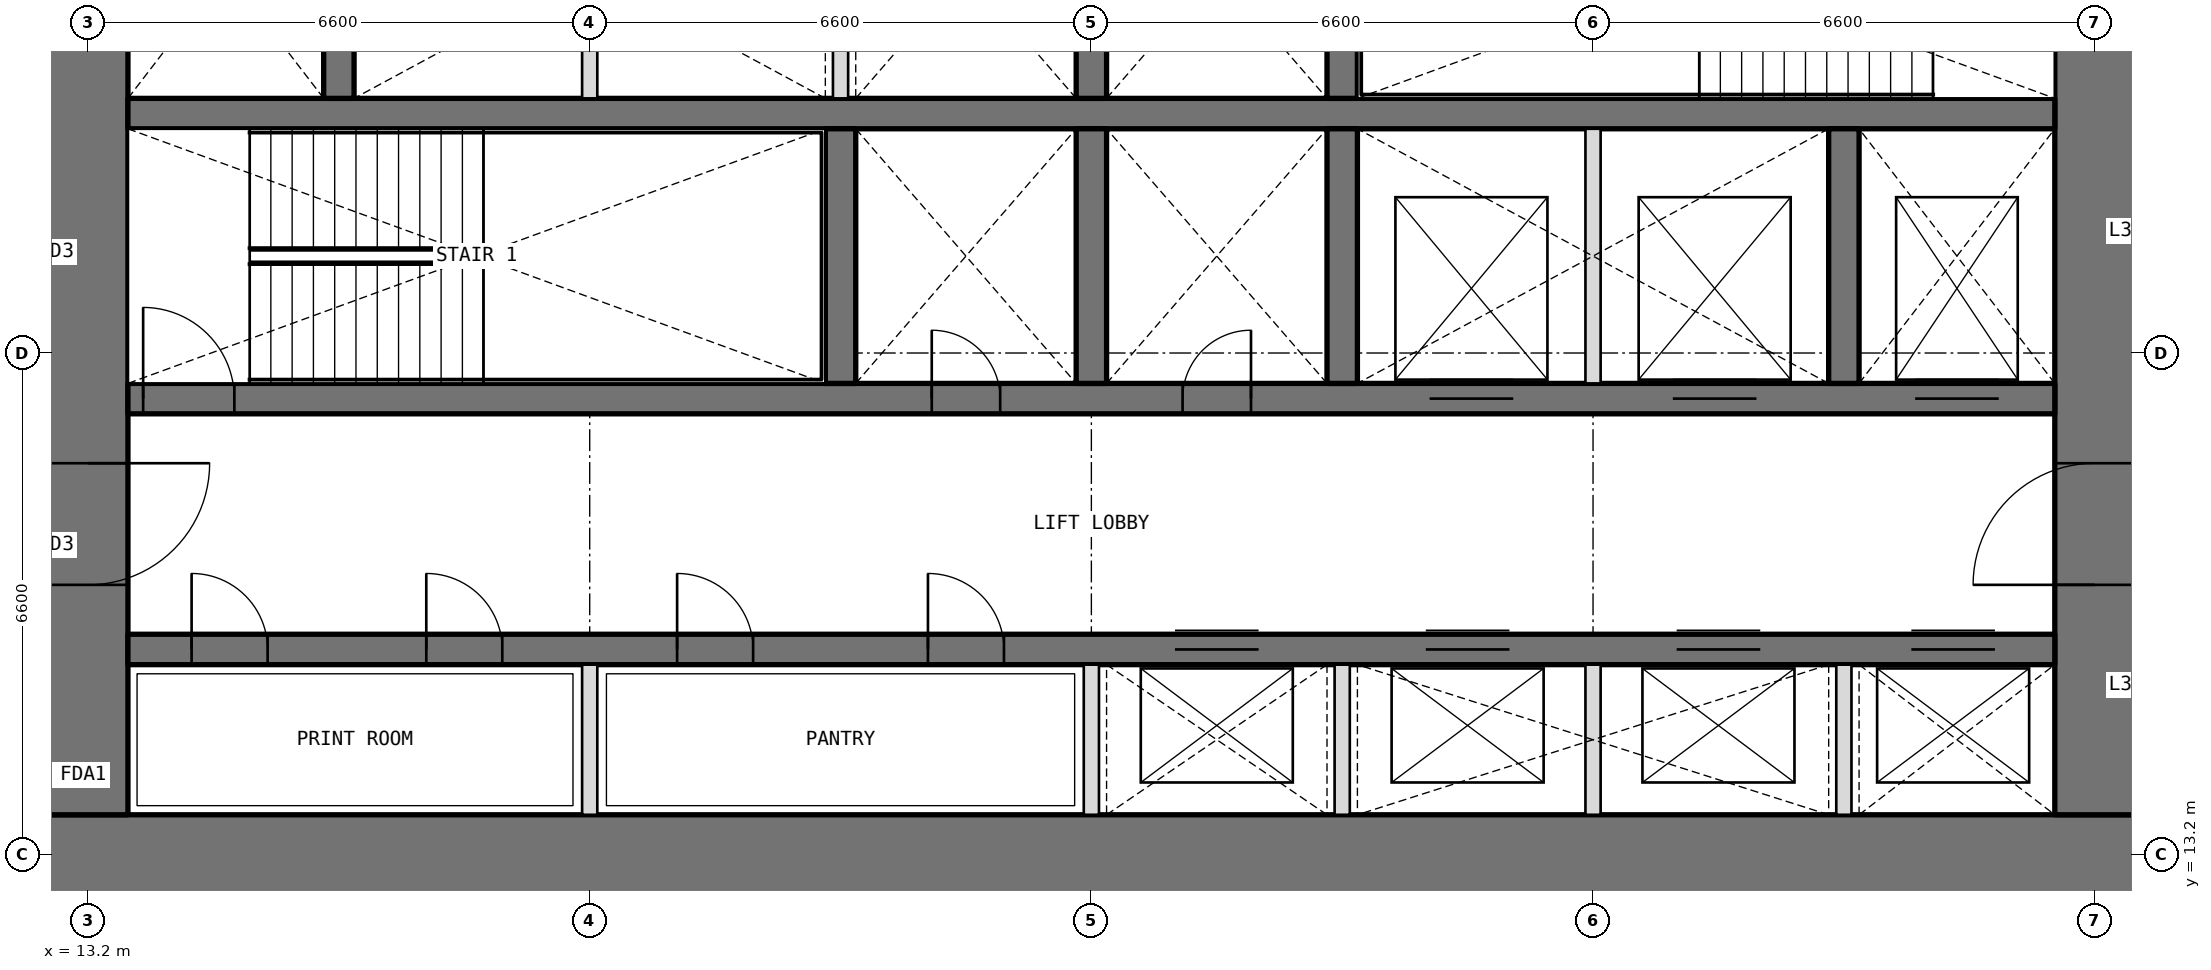
"""IFC4 building model, lengths in metres.
Left out: names, types, materials, properties, quantities, classifications, styles, units other than length and angle.
Written with IfcOpenShell. Run it as: python <this file> out.ifc"""

import sys

from ifc_helpers import new_model, si_unit, direction, frame, frame_2d, origin, place, context, subcontext, project, spatial, rectangle, extrude, element, fill, save


model = new_model("IFC4")
c1 = context("Model", 3, precision=1e-05, world=origin(), true_north=direction((0.0, 1.0)))
c2 = subcontext(c1, "Body", "Model", "MODEL_VIEW")
j1 = project(units=[si_unit("LENGTHUNIT", "METRE"), si_unit("PLANEANGLEUNIT", "RADIAN")], contexts=[c1])
p1 = place(None, origin())
s1 = spatial("IfcSite", under=j1, at=p1, CompositionType="ELEMENT")
p2 = place(p1, origin())
s2 = spatial("IfcBuilding", under=s1, at=p2, CompositionType="ELEMENT")
p3 = place(p2, frame((0.0, 0.0, 145.2)))
s3 = spatial("IfcBuildingStorey", under=s2, at=p3, CompositionType="ELEMENT", Elevation=145.2)
p4 = place(p3, frame((12.675, 13.2, 0.0), z_axis=(0.0, 0.0, 1.0), x_axis=(1.0, 0.0, 0.0)))
e1 = element("IfcWall", 1, at=p4, inside=s3, PredefinedType="SHEAR", context=c2, shape_type="SweptSolid", body=[
    extrude(rectangle(XDim=27.45, YDim=1.05, at=frame_2d((13.725, 0.0))), origin(), (0.0, 0.0, 1.0), 4.2),
])
p5 = place(p3, frame((39.6, 13.725, 0.0), z_axis=(0.0, 0.0, 1.0), x_axis=(0.0, 1.0, 0.0)))
e2 = element("IfcWall", 2, at=p5, inside=s3, PredefinedType="SHEAR", context=c2, shape_type="SweptSolid", body=[
    extrude(rectangle(XDim=18.75, YDim=1.05, at=frame_2d((9.375, 0.0))), origin(), (0.0, 0.0, 1.0), 4.2),
])
p6 = place(p5, frame((3.025, 0.0, 0.0)))
e3 = element("IfcOpeningElement", 3, at=p6, cuts=e2, PredefinedType="OPENING", context=c2, shape_type="SweptSolid", body=[
    extrude(rectangle(XDim=1.6, YDim=2.1, at=frame_2d((0.8, 1.05))), frame((0.0, 0.535, 0.0), z_axis=(0.0, -1.0, 0.0), x_axis=(1.0, 0.0, 0.0)), (0.0, 0.0, 1.0), 1.07),
])
p7 = place(p5, frame((13.825, 0.0, 0.0)))
e4 = element("IfcOpeningElement", 4, at=p7, cuts=e2, PredefinedType="OPENING", context=c2, shape_type="SweptSolid", body=[
    extrude(rectangle(XDim=1.6, YDim=2.1, at=frame_2d((0.8, 1.05))), frame((0.0, 0.535, 0.0), z_axis=(0.0, -1.0, 0.0), x_axis=(1.0, 0.0, 0.0)), (0.0, 0.0, 1.0), 1.07),
])
p8 = place(p3, frame((13.2, 32.475, 0.0), z_axis=(0.0, 0.0, 1.0), x_axis=(0.0, -1.0, 0.0)))
e5 = element("IfcWall", 5, at=p8, inside=s3, PredefinedType="SHEAR", context=c2, shape_type="SweptSolid", body=[
    extrude(rectangle(XDim=18.75, YDim=1.05, at=frame_2d((9.375, 0.0))), origin(), (0.0, 0.0, 1.0), 4.2),
])
p9 = place(p8, frame((14.125, 0.0, 0.0)))
e6 = element("IfcOpeningElement", 6, at=p9, cuts=e5, PredefinedType="OPENING", context=c2, shape_type="SweptSolid", body=[
    extrude(rectangle(XDim=1.6, YDim=2.1, at=frame_2d((0.8, 1.05))), frame((0.0, 0.535, 0.0), z_axis=(0.0, -1.0, 0.0), x_axis=(1.0, 0.0, 0.0)), (0.0, 0.0, 1.0), 1.07),
])
p10 = place(p8, frame((3.325, 0.0, 0.0)))
e7 = element("IfcOpeningElement", 7, at=p10, cuts=e5, PredefinedType="OPENING", context=c2, shape_type="SweptSolid", body=[
    extrude(rectangle(XDim=1.6, YDim=2.1, at=frame_2d((0.8, 1.05))), frame((0.0, 0.535, 0.0), z_axis=(0.0, -1.0, 0.0), x_axis=(1.0, 0.0, 0.0)), (0.0, 0.0, 1.0), 1.07),
])
p11 = place(p3, frame((13.725, 15.9, 0.0), z_axis=(0.0, 0.0, 1.0), x_axis=(1.0, 0.0, 0.0)))
e8 = element("IfcWall", 8, at=p11, inside=s3, PredefinedType="SHEAR", context=c2, shape_type="SweptSolid", body=[
    extrude(rectangle(XDim=25.35, YDim=0.4, at=frame_2d((12.675, 0.0))), origin(), (0.0, 0.0, 1.0), 4.2),
])
p12 = place(p11, frame((0.837, 0.0, 0.0)))
e9 = element("IfcOpeningElement", 9, at=p12, cuts=e8, PredefinedType="OPENING", context=c2, shape_type="SweptSolid", body=[
    extrude(rectangle(XDim=1.0, YDim=2.1, at=frame_2d((0.5, 1.05))), frame((0.0, 0.21, 0.0), z_axis=(0.0, -1.0, 0.0), x_axis=(1.0, 0.0, 0.0)), (0.0, 0.0, 1.0), 0.42),
])
p13 = place(p11, frame((3.925, 0.0, 0.0)))
e10 = element("IfcOpeningElement", 10, at=p13, cuts=e8, PredefinedType="OPENING", context=c2, shape_type="SweptSolid", body=[
    extrude(rectangle(XDim=1.0, YDim=2.1, at=frame_2d((0.5, 1.05))), frame((0.0, 0.21, 0.0), z_axis=(0.0, -1.0, 0.0), x_axis=(1.0, 0.0, 0.0)), (0.0, 0.0, 1.0), 0.42),
])
p14 = place(p11, frame((7.225, 0.0, 0.0)))
e11 = element("IfcOpeningElement", 11, at=p14, cuts=e8, PredefinedType="OPENING", context=c2, shape_type="SweptSolid", body=[
    extrude(rectangle(XDim=1.0, YDim=2.1, at=frame_2d((0.5, 1.05))), frame((0.0, 0.21, 0.0), z_axis=(0.0, -1.0, 0.0), x_axis=(1.0, 0.0, 0.0)), (0.0, 0.0, 1.0), 0.42),
])
p15 = place(p11, frame((10.525, 0.0, 0.0)))
e12 = element("IfcOpeningElement", 12, at=p15, cuts=e8, PredefinedType="OPENING", context=c2, shape_type="SweptSolid", body=[
    extrude(rectangle(XDim=1.0, YDim=2.1, at=frame_2d((0.5, 1.05))), frame((0.0, 0.21, 0.0), z_axis=(0.0, -1.0, 0.0), x_axis=(1.0, 0.0, 0.0)), (0.0, 0.0, 1.0), 0.42),
])
p16 = place(p11, frame((13.775, 0.0, 0.0)))
e13 = element("IfcOpeningElement", 13, at=p16, cuts=e8, PredefinedType="OPENING", context=c2, shape_type="SweptSolid", body=[
    extrude(rectangle(XDim=1.1, YDim=2.1, at=frame_2d((0.55, 1.05))), frame((0.0, 0.21, 0.0), z_axis=(0.0, -1.0, 0.0), x_axis=(1.0, 0.0, 0.0)), (0.0, 0.0, 1.0), 0.42),
])
p17 = place(p11, frame((17.075, 0.0, 0.0)))
e14 = element("IfcOpeningElement", 14, at=p17, cuts=e8, PredefinedType="OPENING", context=c2, shape_type="SweptSolid", body=[
    extrude(rectangle(XDim=1.1, YDim=2.1, at=frame_2d((0.55, 1.05))), frame((0.0, 0.21, 0.0), z_axis=(0.0, -1.0, 0.0), x_axis=(1.0, 0.0, 0.0)), (0.0, 0.0, 1.0), 0.42),
])
p18 = place(p11, frame((20.375, 0.0, 0.0)))
e15 = element("IfcOpeningElement", 15, at=p18, cuts=e8, PredefinedType="OPENING", context=c2, shape_type="SweptSolid", body=[
    extrude(rectangle(XDim=1.1, YDim=2.1, at=frame_2d((0.55, 1.05))), frame((0.0, 0.21, 0.0), z_axis=(0.0, -1.0, 0.0), x_axis=(1.0, 0.0, 0.0)), (0.0, 0.0, 1.0), 0.42),
])
p19 = place(p11, frame((23.462, 0.0, 0.0)))
e16 = element("IfcOpeningElement", 16, at=p19, cuts=e8, PredefinedType="OPENING", context=c2, shape_type="SweptSolid", body=[
    extrude(rectangle(XDim=1.1, YDim=2.1, at=frame_2d((0.55, 1.05))), frame((0.0, 0.21, 0.0), z_axis=(0.0, -1.0, 0.0), x_axis=(1.0, 0.0, 0.0)), (0.0, 0.0, 1.0), 0.42),
])
p20 = place(p3, frame((13.725, 19.2, 0.0), z_axis=(0.0, 0.0, 1.0), x_axis=(1.0, 0.0, 0.0)))
e17 = element("IfcWall", 17, at=p20, inside=s3, PredefinedType="SHEAR", context=c2, shape_type="SweptSolid", body=[
    extrude(rectangle(XDim=25.35, YDim=0.4, at=frame_2d((12.675, 0.0))), origin(), (0.0, 0.0, 1.0), 4.2),
])
p21 = place(p20, frame((10.575, 0.0, 0.0)))
e18 = element("IfcOpeningElement", 18, at=p21, cuts=e17, PredefinedType="OPENING", context=c2, shape_type="SweptSolid", body=[
    extrude(rectangle(XDim=0.9, YDim=2.1, at=frame_2d((0.45, 1.05))), frame((0.0, 0.21, 0.0), z_axis=(0.0, -1.0, 0.0), x_axis=(1.0, 0.0, 0.0)), (0.0, 0.0, 1.0), 0.42),
])
p22 = place(p20, frame((13.875, 0.0, 0.0)))
e19 = element("IfcOpeningElement", 19, at=p22, cuts=e17, PredefinedType="OPENING", context=c2, shape_type="SweptSolid", body=[
    extrude(rectangle(XDim=0.9, YDim=2.1, at=frame_2d((0.45, 1.05))), frame((0.0, 0.21, 0.0), z_axis=(0.0, -1.0, 0.0), x_axis=(1.0, 0.0, 0.0)), (0.0, 0.0, 1.0), 0.42),
])
p23 = place(p20, frame((0.2, 0.0, 0.0)))
e20 = element("IfcOpeningElement", 20, at=p23, cuts=e17, PredefinedType="OPENING", context=c2, shape_type="SweptSolid", body=[
    extrude(rectangle(XDim=1.2, YDim=2.1, at=frame_2d((0.6, 1.05))), frame((0.0, 0.21, 0.0), z_axis=(0.0, -1.0, 0.0), x_axis=(1.0, 0.0, 0.0)), (0.0, 0.0, 1.0), 0.42),
])
p24 = place(p20, frame((23.512, 0.0, 0.0)))
e21 = element("IfcOpeningElement", 21, at=p24, cuts=e17, PredefinedType="OPENING", context=c2, shape_type="SweptSolid", body=[
    extrude(rectangle(XDim=1.1, YDim=2.1, at=frame_2d((0.55, 1.05))), frame((0.0, 0.21, 0.0), z_axis=(0.0, -1.0, 0.0), x_axis=(1.0, 0.0, 0.0)), (0.0, 0.0, 1.0), 0.42),
])
p25 = place(p20, frame((17.125, 0.0, 0.0)))
e22 = element("IfcOpeningElement", 22, at=p25, cuts=e17, PredefinedType="OPENING", context=c2, shape_type="SweptSolid", body=[
    extrude(rectangle(XDim=1.1, YDim=2.1, at=frame_2d((0.55, 1.05))), frame((0.0, 0.21, 0.0), z_axis=(0.0, -1.0, 0.0), x_axis=(1.0, 0.0, 0.0)), (0.0, 0.0, 1.0), 0.42),
])
p26 = place(p20, frame((20.325, 0.0, 0.0)))
e23 = element("IfcOpeningElement", 23, at=p26, cuts=e17, PredefinedType="OPENING", context=c2, shape_type="SweptSolid", body=[
    extrude(rectangle(XDim=1.1, YDim=2.1, at=frame_2d((0.55, 1.05))), frame((0.0, 0.21, 0.0), z_axis=(0.0, -1.0, 0.0), x_axis=(1.0, 0.0, 0.0)), (0.0, 0.0, 1.0), 0.42),
])
p27 = place(p3, frame((13.725, 22.95, 0.0), z_axis=(0.0, 0.0, 1.0), x_axis=(1.0, 0.0, 0.0)))
e24 = element("IfcWall", 24, at=p27, inside=s3, PredefinedType="SHEAR", context=c2, shape_type="SweptSolid", body=[
    extrude(rectangle(XDim=25.35, YDim=0.4, at=frame_2d((12.675, 0.0))), origin(), (0.0, 0.0, 1.0), 4.2),
])
for number, where, z_axis, x_axis in (
    (25, (23.1, 19.4, 0.0), (0.0, 0.0, 1.0), (0.0, 1.0, 0.0)),
    (26, (26.4, 19.4, 0.0), (0.0, 0.0, 1.0), (0.0, 1.0, 0.0)),
    (27, (29.7, 19.4, 0.0), (0.0, 0.0, 1.0), (0.0, 1.0, 0.0)),
    (28, (36.3, 19.4, 0.0), (0.0, 0.0, 1.0), (0.0, 1.0, 0.0)),
    (29, (16.5, 23.15, 0.0), (0.0, 0.0, 1.0), (0.0, 1.0, 0.0)),
    (30, (26.4, 23.15, 0.0), (0.0, 0.0, 1.0), (0.0, 1.0, 0.0)),
    (31, (29.7, 23.15, 0.0), (0.0, 0.0, 1.0), (0.0, 1.0, 0.0)),
):
    element("IfcWall", number, at=place(p3, frame(where, z_axis=z_axis, x_axis=x_axis)), inside=s3, PredefinedType="SHEAR", context=c2, shape_type="SweptSolid", body=[
        extrude(rectangle(XDim=3.35, YDim=0.4, at=frame_2d((1.675, 0.0))), origin(), (0.0, 0.0, 1.0), 4.2),
    ])
for number, where, z_axis, x_axis in (
    (32, (19.8, 13.725, 0.0), (0.0, 0.0, 1.0), (0.0, 1.0, 0.0)),
    (33, (26.4, 13.725, 0.0), (0.0, 0.0, 1.0), (0.0, 1.0, 0.0)),
    (34, (29.7, 13.725, 0.0), (0.0, 0.0, 1.0), (0.0, 1.0, 0.0)),
    (35, (33.0, 13.725, 0.0), (0.0, 0.0, 1.0), (0.0, 1.0, 0.0)),
    (36, (36.3, 13.725, 0.0), (0.0, 0.0, 1.0), (0.0, 1.0, 0.0)),
):
    element("IfcWall", number, at=place(p3, frame(where, z_axis=z_axis, x_axis=x_axis)), inside=s3, PredefinedType="PARTITIONING", context=c2, shape_type="SweptSolid", body=[
        extrude(rectangle(XDim=1.975, YDim=0.2, at=frame_2d((0.987, 0.0))), origin(), (0.0, 0.0, 1.0), 4.2),
    ])
for number, where, z_axis, x_axis in (
    (37, (33.0, 19.4, 0.0), (0.0, 0.0, 1.0), (0.0, 1.0, 0.0)),
    (38, (19.8, 23.15, 0.0), (0.0, 0.0, 1.0), (0.0, 1.0, 0.0)),
    (39, (23.1, 23.15, 0.0), (0.0, 0.0, 1.0), (0.0, 1.0, 0.0)),
):
    element("IfcWall", number, at=place(p3, frame(where, z_axis=z_axis, x_axis=x_axis)), inside=s3, PredefinedType="PARTITIONING", context=c2, shape_type="SweptSolid", body=[
        extrude(rectangle(XDim=3.35, YDim=0.2, at=frame_2d((1.675, 0.0))), origin(), (0.0, 0.0, 1.0), 4.2),
    ])
p28 = place(p21, origin())
e40 = element("IfcDoor", 40, at=p28, inside=s3, OperationType="SINGLE_SWING_LEFT", PredefinedType="DOOR", context=c2, shape_type="SweptSolid", body=[
    extrude(rectangle(XDim=0.9, YDim=2.1, at=frame_2d((0.45, 1.05))), frame((0.0, 0.025, 0.0), z_axis=(0.0, -1.0, 0.0), x_axis=(1.0, 0.0, 0.0)), (0.0, 0.0, 1.0), 0.05),
])
fill(e18, e40)
p29 = place(p22, origin())
e41 = element("IfcDoor", 41, at=p29, inside=s3, OperationType="SINGLE_SWING_RIGHT", PredefinedType="DOOR", context=c2, shape_type="SweptSolid", body=[
    extrude(rectangle(XDim=0.9, YDim=2.1, at=frame_2d((0.45, 1.05))), frame((0.0, 0.025, 0.0), z_axis=(0.0, -1.0, 0.0), x_axis=(1.0, 0.0, 0.0)), (0.0, 0.0, 1.0), 0.05),
])
fill(e19, e41)
p30 = place(p12, origin())
e42 = element("IfcDoor", 42, at=p30, inside=s3, OperationType="SINGLE_SWING_LEFT", PredefinedType="DOOR", context=c2, shape_type="SweptSolid", body=[
    extrude(rectangle(XDim=1.0, YDim=2.1, at=frame_2d((0.5, 1.05))), frame((0.0, 0.025, 0.0), z_axis=(0.0, -1.0, 0.0), x_axis=(1.0, 0.0, 0.0)), (0.0, 0.0, 1.0), 0.05),
])
fill(e9, e42)
p31 = place(p13, origin())
e43 = element("IfcDoor", 43, at=p31, inside=s3, OperationType="SINGLE_SWING_LEFT", PredefinedType="DOOR", context=c2, shape_type="SweptSolid", body=[
    extrude(rectangle(XDim=1.0, YDim=2.1, at=frame_2d((0.5, 1.05))), frame((0.0, 0.025, 0.0), z_axis=(0.0, -1.0, 0.0), x_axis=(1.0, 0.0, 0.0)), (0.0, 0.0, 1.0), 0.05),
])
fill(e10, e43)
p32 = place(p14, origin())
e44 = element("IfcDoor", 44, at=p32, inside=s3, OperationType="SINGLE_SWING_LEFT", PredefinedType="DOOR", context=c2, shape_type="SweptSolid", body=[
    extrude(rectangle(XDim=1.0, YDim=2.1, at=frame_2d((0.5, 1.05))), frame((0.0, 0.025, 0.0), z_axis=(0.0, -1.0, 0.0), x_axis=(1.0, 0.0, 0.0)), (0.0, 0.0, 1.0), 0.05),
])
fill(e11, e44)
p33 = place(p15, origin())
e45 = element("IfcDoor", 45, at=p33, inside=s3, OperationType="SINGLE_SWING_LEFT", PredefinedType="DOOR", context=c2, shape_type="SweptSolid", body=[
    extrude(rectangle(XDim=1.0, YDim=2.1, at=frame_2d((0.5, 1.05))), frame((0.0, 0.025, 0.0), z_axis=(0.0, -1.0, 0.0), x_axis=(1.0, 0.0, 0.0)), (0.0, 0.0, 1.0), 0.05),
])
fill(e12, e45)
p34 = place(p23, origin())
e46 = element("IfcDoor", 46, at=p34, inside=s3, OperationType="SINGLE_SWING_LEFT", PredefinedType="DOOR", context=c2, shape_type="SweptSolid", body=[
    extrude(rectangle(XDim=1.2, YDim=2.1, at=frame_2d((0.6, 1.05))), frame((0.0, 0.025, 0.0), z_axis=(0.0, -1.0, 0.0), x_axis=(1.0, 0.0, 0.0)), (0.0, 0.0, 1.0), 0.05),
])
fill(e20, e46)
p35 = place(p9, origin())
e47 = element("IfcDoor", 47, at=p35, inside=s3, OperationType="DOUBLE_DOOR_DOUBLE_SWING", PredefinedType="DOOR", context=c2, shape_type="SweptSolid", body=[
    extrude(rectangle(XDim=1.6, YDim=2.1, at=frame_2d((0.8, 1.05))), frame((0.0, 0.025, 0.0), z_axis=(0.0, -1.0, 0.0), x_axis=(1.0, 0.0, 0.0)), (0.0, 0.0, 1.0), 0.05),
])
fill(e6, e47)
p36 = place(p6, origin())
e48 = element("IfcDoor", 48, at=p36, inside=s3, OperationType="DOUBLE_DOOR_DOUBLE_SWING", PredefinedType="DOOR", context=c2, shape_type="SweptSolid", body=[
    extrude(rectangle(XDim=1.6, YDim=2.1, at=frame_2d((0.8, 1.05))), frame((0.0, 0.025, 0.0), z_axis=(0.0, -1.0, 0.0), x_axis=(1.0, 0.0, 0.0)), (0.0, 0.0, 1.0), 0.05),
])
fill(e3, e48)
p37 = place(p16, origin())
e49 = element("IfcDoor", 49, at=p37, inside=s3, OperationType="DOUBLE_DOOR_SLIDING", PredefinedType="DOOR", context=c2, shape_type="SweptSolid", body=[
    extrude(rectangle(XDim=1.1, YDim=2.1, at=frame_2d((0.55, 1.05))), frame((0.0, 0.025, 0.0), z_axis=(0.0, -1.0, 0.0), x_axis=(1.0, 0.0, 0.0)), (0.0, 0.0, 1.0), 0.05),
])
fill(e13, e49)
p38 = place(p17, origin())
e50 = element("IfcDoor", 50, at=p38, inside=s3, OperationType="DOUBLE_DOOR_SLIDING", PredefinedType="DOOR", context=c2, shape_type="SweptSolid", body=[
    extrude(rectangle(XDim=1.1, YDim=2.1, at=frame_2d((0.55, 1.05))), frame((0.0, 0.025, 0.0), z_axis=(0.0, -1.0, 0.0), x_axis=(1.0, 0.0, 0.0)), (0.0, 0.0, 1.0), 0.05),
])
fill(e14, e50)
p39 = place(p18, origin())
e51 = element("IfcDoor", 51, at=p39, inside=s3, OperationType="DOUBLE_DOOR_SLIDING", PredefinedType="DOOR", context=c2, shape_type="SweptSolid", body=[
    extrude(rectangle(XDim=1.1, YDim=2.1, at=frame_2d((0.55, 1.05))), frame((0.0, 0.025, 0.0), z_axis=(0.0, -1.0, 0.0), x_axis=(1.0, 0.0, 0.0)), (0.0, 0.0, 1.0), 0.05),
])
fill(e15, e51)
p40 = place(p19, origin())
e52 = element("IfcDoor", 52, at=p40, inside=s3, OperationType="DOUBLE_DOOR_SLIDING", PredefinedType="DOOR", context=c2, shape_type="SweptSolid", body=[
    extrude(rectangle(XDim=1.1, YDim=2.1, at=frame_2d((0.55, 1.05))), frame((0.0, 0.025, 0.0), z_axis=(0.0, -1.0, 0.0), x_axis=(1.0, 0.0, 0.0)), (0.0, 0.0, 1.0), 0.05),
])
fill(e16, e52)
p41 = place(p24, origin())
e53 = element("IfcDoor", 53, at=p41, inside=s3, OperationType="DOUBLE_DOOR_SLIDING", PredefinedType="DOOR", context=c2, shape_type="SweptSolid", body=[
    extrude(rectangle(XDim=1.1, YDim=2.1, at=frame_2d((0.55, 1.05))), frame((0.0, 0.025, 0.0), z_axis=(0.0, -1.0, 0.0), x_axis=(1.0, 0.0, 0.0)), (0.0, 0.0, 1.0), 0.05),
])
fill(e21, e53)
p42 = place(p25, origin())
e54 = element("IfcDoor", 54, at=p42, inside=s3, OperationType="DOUBLE_DOOR_SLIDING", PredefinedType="DOOR", context=c2, shape_type="SweptSolid", body=[
    extrude(rectangle(XDim=1.1, YDim=2.1, at=frame_2d((0.55, 1.05))), frame((0.0, 0.025, 0.0), z_axis=(0.0, -1.0, 0.0), x_axis=(1.0, 0.0, 0.0)), (0.0, 0.0, 1.0), 0.05),
])
fill(e22, e54)
p43 = place(p26, origin())
e55 = element("IfcDoor", 55, at=p43, inside=s3, OperationType="DOUBLE_DOOR_SLIDING", PredefinedType="DOOR", context=c2, shape_type="SweptSolid", body=[
    extrude(rectangle(XDim=1.1, YDim=2.1, at=frame_2d((0.55, 1.05))), frame((0.0, 0.025, 0.0), z_axis=(0.0, -1.0, 0.0), x_axis=(1.0, 0.0, 0.0)), (0.0, 0.0, 1.0), 0.05),
])
fill(e23, e55)
save(model, sys.argv[1])
